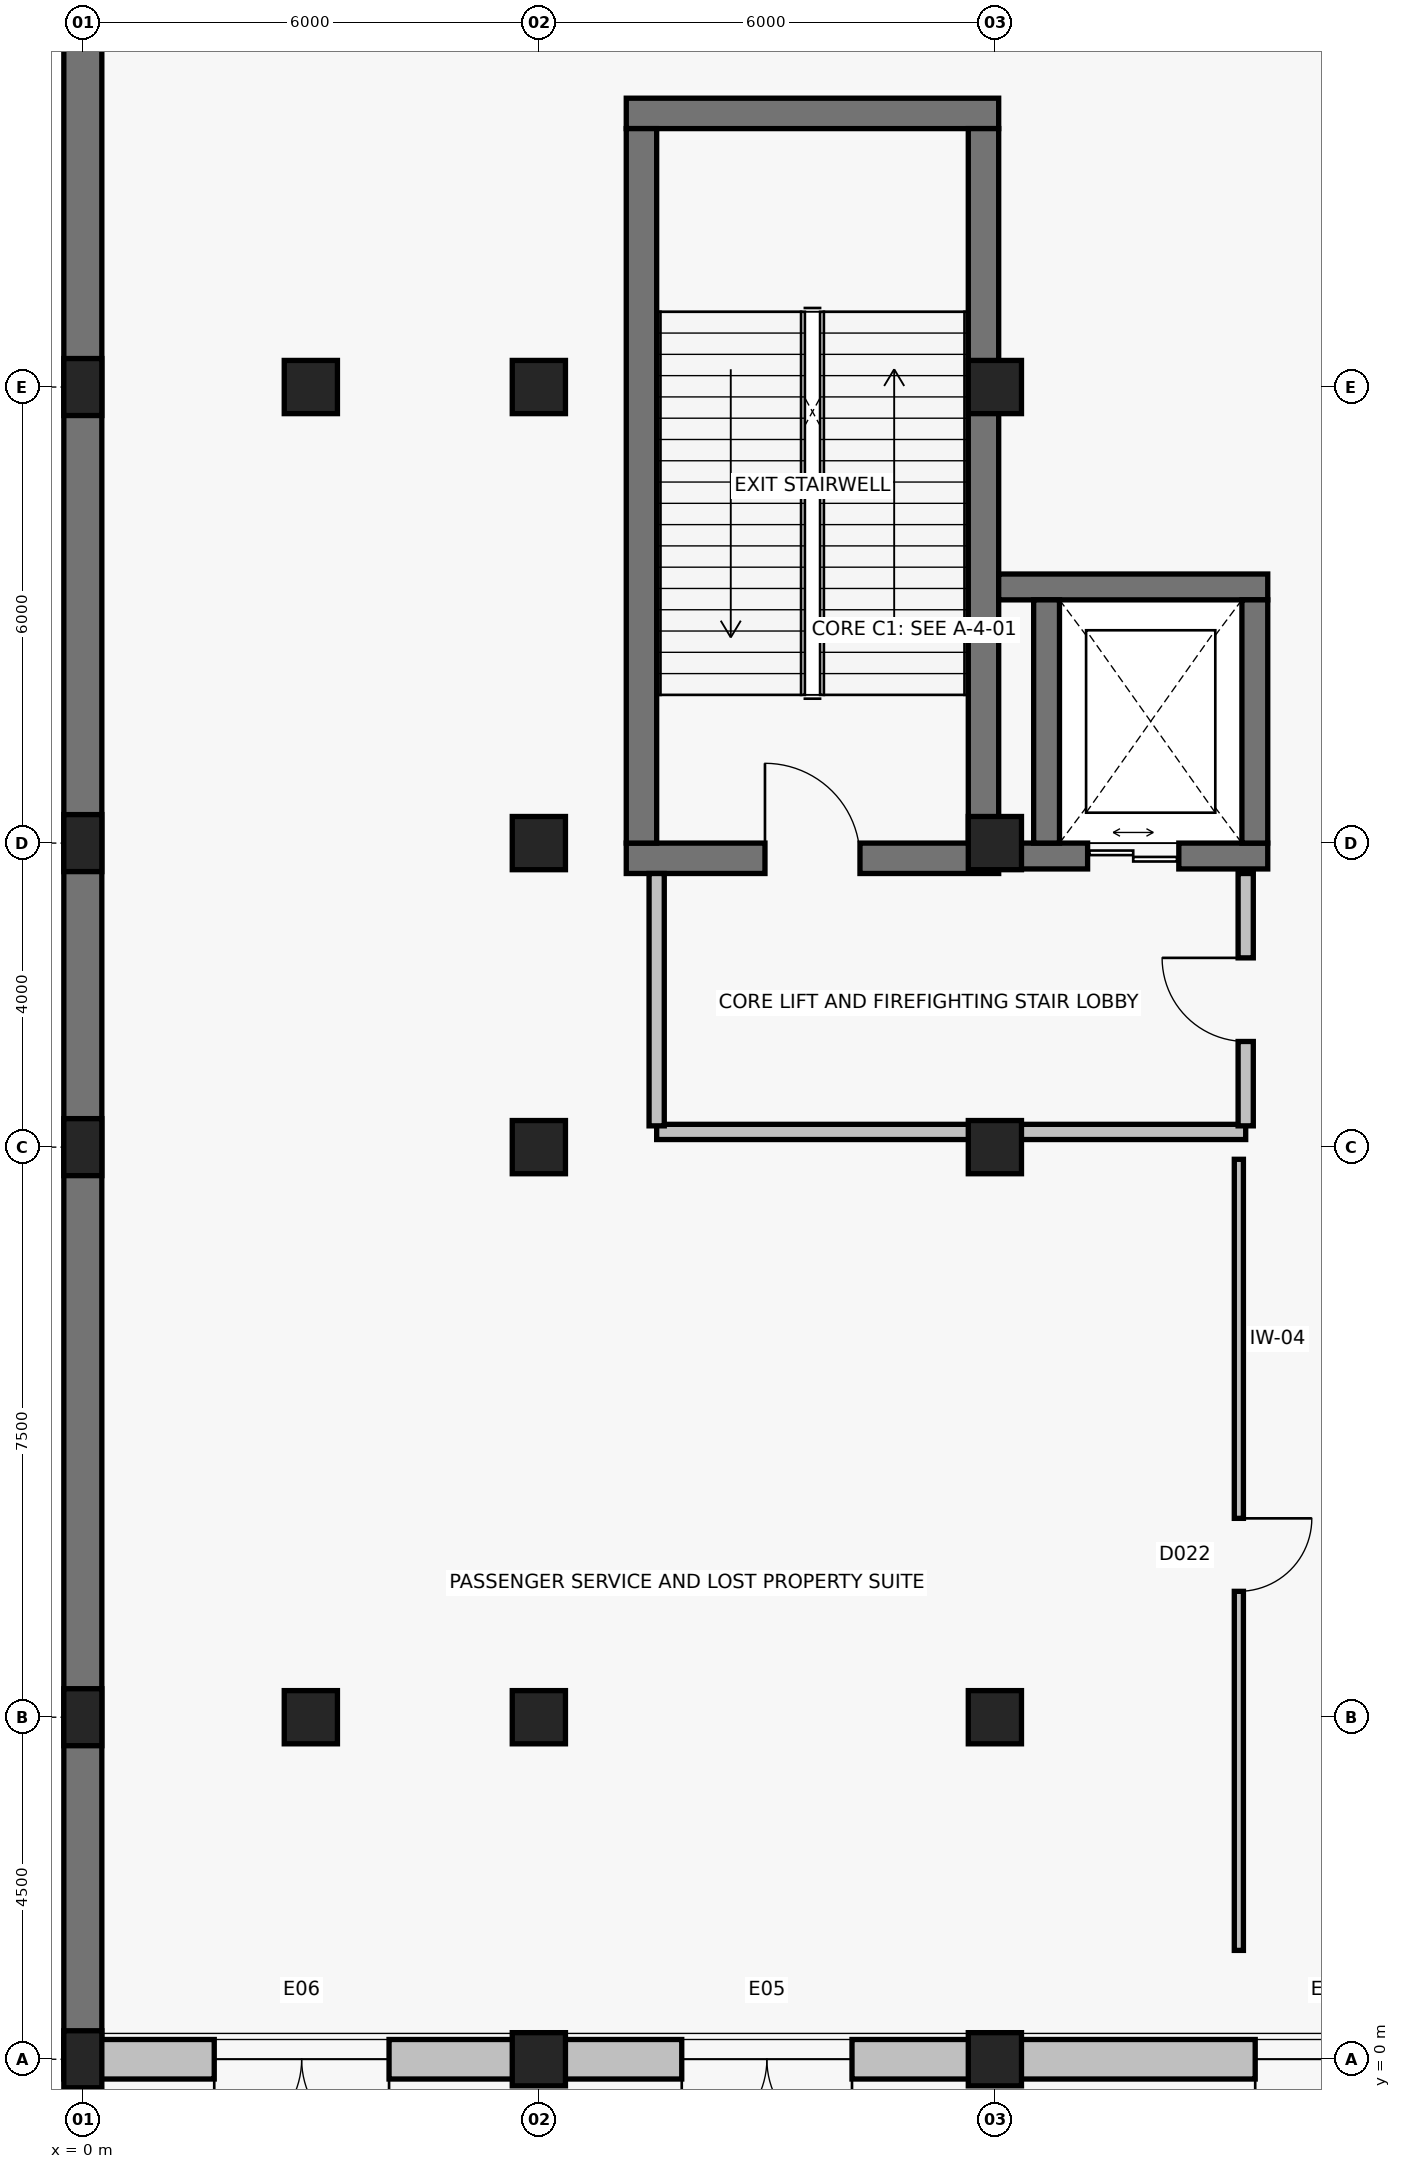
"""IFC4 building model, lengths in metres.
Left out: names, types, materials, properties, quantities, classifications, styles, units other than length and angle.
Written with IfcOpenShell. Run it as: python <this file> out.ifc"""

import sys

from ifc_helpers import new_model, si_unit, direction, frame, frame_2d, origin, origin_2d, place, context, subcontext, project, spatial, rectangle, extrude, element, fill, save


model = new_model("IFC4")
c1 = context("Model", 3, precision=1e-05, world=origin(), true_north=direction((0.0, 1.0)))
c2 = subcontext(c1, "Body", "Model", "MODEL_VIEW")
j1 = project(units=[si_unit("LENGTHUNIT", "METRE"), si_unit("PLANEANGLEUNIT", "RADIAN")], contexts=[c1])
p1 = place(None, origin())
s1 = spatial("IfcSite", under=j1, at=p1, CompositionType="ELEMENT")
p2 = place(p1, origin())
s2 = spatial("IfcBuilding", under=s1, at=p2, CompositionType="ELEMENT")
p3 = place(p2, origin())
s3 = spatial("IfcBuildingStorey", under=s2, at=p3, CompositionType="ELEMENT", Elevation=0.0)
for number, where, z_axis, x_axis in (
    (1, (0.0, 0.0, 0.0), (0.0, 0.0, 1.0), (1.0, 0.0, 0.0)),
    (2, (0.0, 4.5, 0.0), (0.0, 0.0, 1.0), (1.0, 0.0, 0.0)),
    (3, (0.0, 12.0, 0.0), (0.0, 0.0, 1.0), (1.0, 0.0, 0.0)),
    (4, (0.0, 16.0, 0.0), (0.0, 0.0, 1.0), (1.0, 0.0, 0.0)),
    (5, (0.0, 22.0, 0.0), (0.0, 0.0, 1.0), (1.0, 0.0, 0.0)),
):
    element("IfcColumn", number, at=place(p3, frame(where, z_axis=z_axis, x_axis=x_axis)), inside=s3, PredefinedType="PILASTER", context=c2, shape_type="SweptSolid", body=[
        extrude(rectangle(XDim=0.5, YDim=0.75, at=origin_2d()), origin(), (0.0, 0.0, 1.0), 6.6),
    ])
for number, where, z_axis, x_axis in (
    (6, (3.0, 4.5, 0.0), (0.0, 0.0, 1.0), (1.0, 0.0, 0.0)),
    (7, (3.0, 22.0, 0.0), (0.0, 0.0, 1.0), (1.0, 0.0, 0.0)),
    (8, (6.0, 0.0, 0.0), (0.0, 0.0, 1.0), (1.0, 0.0, 0.0)),
    (9, (6.0, 4.5, 0.0), (0.0, 0.0, 1.0), (1.0, 0.0, 0.0)),
    (10, (6.0, 12.0, 0.0), (0.0, 0.0, 1.0), (1.0, 0.0, 0.0)),
    (11, (6.0, 16.0, 0.0), (0.0, 0.0, 1.0), (1.0, 0.0, 0.0)),
    (12, (6.0, 22.0, 0.0), (0.0, 0.0, 1.0), (1.0, 0.0, 0.0)),
    (13, (12.0, 0.0, 0.0), (0.0, 0.0, 1.0), (1.0, 0.0, 0.0)),
    (14, (12.0, 4.5, 0.0), (0.0, 0.0, 1.0), (1.0, 0.0, 0.0)),
    (15, (12.0, 12.0, 0.0), (0.0, 0.0, 1.0), (1.0, 0.0, 0.0)),
    (16, (12.0, 16.0, 0.0), (0.0, 0.0, 1.0), (1.0, 0.0, 0.0)),
    (17, (12.0, 22.0, 0.0), (0.0, 0.0, 1.0), (1.0, 0.0, 0.0)),
):
    element("IfcColumn", number, at=place(p3, frame(where, z_axis=z_axis, x_axis=x_axis)), inside=s3, PredefinedType="COLUMN", context=c2, shape_type="SweptSolid", body=[
        extrude(rectangle(XDim=0.7, YDim=0.7, at=origin_2d()), origin(), (0.0, 0.0, 1.0), 6.6),
    ])
p4 = place(p3, frame((0.0, -0.008, 0.0), z_axis=(0.0, 0.0, 1.0), x_axis=(0.0, 1.0, 0.0)))
e18 = element("IfcWall", 18, at=p4, inside=s3, PredefinedType="SOLIDWALL", context=c2, shape_type="SweptSolid", body=[
    extrude(rectangle(XDim=96.016, YDim=0.5, at=frame_2d((48.008, 0.0))), origin(), (0.0, 0.0, 1.0), 6.32),
])
p5 = place(p3, frame((18.008, 0.0, 0.0), z_axis=(0.0, 0.0, 1.0), x_axis=(-1.0, 0.0, 0.0)))
e19 = element("IfcWall", 19, at=p5, inside=s3, PredefinedType="SOLIDWALL", context=c2, shape_type="SweptSolid", body=[
    extrude(rectangle(XDim=6.016, YDim=0.52, at=frame_2d((3.008, 0.0))), origin(), (0.0, 0.0, 1.0), 5.761),
])
p6 = place(p5, frame((0.633, 0.0, 0.0)))
e20 = element("IfcOpeningElement", 20, at=p6, cuts=e19, PredefinedType="OPENING", context=c2, shape_type="SweptSolid", body=[
    extrude(rectangle(XDim=1.95, YDim=2.4, at=frame_2d((0.975, 1.2))), frame((0.0, 0.275, 0.0), z_axis=(0.0, -1.0, 0.0), x_axis=(1.0, 0.0, 0.0)), (0.0, 0.0, 1.0), 0.55),
])
p7 = place(p3, frame((12.008, 0.0, 0.0), z_axis=(0.0, 0.0, 1.0), x_axis=(-1.0, 0.0, 0.0)))
e21 = element("IfcWall", 21, at=p7, inside=s3, PredefinedType="SOLIDWALL", context=c2, shape_type="SweptSolid", body=[
    extrude(rectangle(XDim=6.016, YDim=0.52, at=frame_2d((3.008, 0.0))), origin(), (0.0, 0.0, 1.0), 5.761),
])
p8 = place(p7, frame((1.888, 0.0, 0.0)))
e22 = element("IfcOpeningElement", 22, at=p8, cuts=e21, PredefinedType="OPENING", context=c2, shape_type="SweptSolid", body=[
    extrude(rectangle(XDim=2.24, YDim=2.6, at=frame_2d((1.12, 1.3))), frame((0.0, 0.275, 0.0), z_axis=(0.0, -1.0, 0.0), x_axis=(1.0, 0.0, 0.0)), (0.0, 0.0, 1.0), 0.55),
])
p9 = place(p3, frame((6.008, 0.0, 0.0), z_axis=(0.0, 0.0, 1.0), x_axis=(-1.0, 0.0, 0.0)))
e23 = element("IfcWall", 23, at=p9, inside=s3, PredefinedType="SOLIDWALL", context=c2, shape_type="SweptSolid", body=[
    extrude(rectangle(XDim=6.258, YDim=0.52, at=frame_2d((3.129, 0.0))), origin(), (0.0, 0.0, 1.0), 5.837),
])
p10 = place(p9, frame((1.979, 0.0, 0.0)))
e24 = element("IfcOpeningElement", 24, at=p10, cuts=e23, PredefinedType="OPENING", context=c2, shape_type="SweptSolid", body=[
    extrude(rectangle(XDim=2.3, YDim=2.65, at=frame_2d((1.15, 1.325))), frame((0.0, 0.275, 0.0), z_axis=(0.0, -1.0, 0.0), x_axis=(1.0, 0.0, 0.0)), (0.0, 0.0, 1.0), 0.55),
])
p11 = place(p3, frame((7.15, 15.8, 0.0), z_axis=(0.0, 0.0, 1.0), x_axis=(1.0, 0.0, 0.0)))
e25 = element("IfcWall", 25, at=p11, inside=s3, PredefinedType="SHEAR", context=c2, shape_type="SweptSolid", body=[
    extrude(rectangle(XDim=4.9, YDim=0.4, at=frame_2d((2.45, 0.0))), origin(), (0.0, 0.0, 1.0), 6.32),
])
p12 = place(p11, frame((1.825, 0.0, 0.0)))
e26 = element("IfcOpeningElement", 26, at=p12, cuts=e25, PredefinedType="OPENING", context=c2, shape_type="SweptSolid", body=[
    extrude(rectangle(XDim=1.25, YDim=2.2, at=frame_2d((0.625, 1.1))), frame((0.0, 0.215, 0.0), z_axis=(0.0, -1.0, 0.0), x_axis=(1.0, 0.0, 0.0)), (0.0, 0.0, 1.0), 0.43),
])
p13 = place(p3, frame((12.05, 25.6, 0.0), z_axis=(0.0, 0.0, 1.0), x_axis=(-1.0, 0.0, 0.0)))
e27 = element("IfcWall", 27, at=p13, inside=s3, PredefinedType="SHEAR", context=c2, shape_type="SweptSolid", body=[
    extrude(rectangle(XDim=4.9, YDim=0.4, at=frame_2d((2.45, 0.0))), origin(), (0.0, 0.0, 1.0), 6.32),
])
for number, where, z_axis, x_axis in (
    (28, (7.35, 25.4, 0.0), (0.0, 0.0, 1.0), (0.0, -1.0, 0.0)),
    (29, (11.85, 16.0, 0.0), (0.0, 0.0, 1.0), (0.0, 1.0, 0.0)),
):
    element("IfcWall", number, at=place(p3, frame(where, z_axis=z_axis, x_axis=x_axis)), inside=s3, PredefinedType="SHEAR", context=c2, shape_type="SweptSolid", body=[
        extrude(rectangle(XDim=9.4, YDim=0.4, at=frame_2d((4.7, 0.0))), origin(), (0.0, 0.0, 1.0), 6.32),
    ])
p14 = place(p3, frame((12.05, 15.83, 0.0), z_axis=(0.0, 0.0, 1.0), x_axis=(1.0, 0.0, 0.0)))
e30 = element("IfcWall", 30, at=p14, inside=s3, PredefinedType="SHEAR", context=c2, shape_type="SweptSolid", body=[
    extrude(rectangle(XDim=3.54, YDim=0.34, at=frame_2d((1.77, 0.0))), origin(), (0.0, 0.0, 1.0), 6.32),
])
p15 = place(p14, frame((1.17, 0.0, 0.0)))
e31 = element("IfcOpeningElement", 31, at=p15, cuts=e30, PredefinedType="OPENING", context=c2, shape_type="SweptSolid", body=[
    extrude(rectangle(XDim=1.2, YDim=2.2, at=frame_2d((0.6, 1.1))), frame((0.0, 0.185, 0.0), z_axis=(0.0, -1.0, 0.0), x_axis=(1.0, 0.0, 0.0)), (0.0, 0.0, 1.0), 0.37),
])
p16 = place(p3, frame((15.59, 19.37, 0.0), z_axis=(0.0, 0.0, 1.0), x_axis=(-1.0, 0.0, 0.0)))
e32 = element("IfcWall", 32, at=p16, inside=s3, PredefinedType="SHEAR", context=c2, shape_type="SweptSolid", body=[
    extrude(rectangle(XDim=3.54, YDim=0.34, at=frame_2d((1.77, 0.0))), origin(), (0.0, 0.0, 1.0), 6.32),
])
for number, where, z_axis, x_axis in (
    (33, (12.68, 19.2, 0.0), (0.0, 0.0, 1.0), (0.0, -1.0, 0.0)),
    (34, (15.42, 16.0, 0.0), (0.0, 0.0, 1.0), (0.0, 1.0, 0.0)),
):
    element("IfcWall", number, at=place(p3, frame(where, z_axis=z_axis, x_axis=x_axis)), inside=s3, PredefinedType="SHEAR", context=c2, shape_type="SweptSolid", body=[
        extrude(rectangle(XDim=3.2, YDim=0.34, at=frame_2d((1.6, 0.0))), origin(), (0.0, 0.0, 1.0), 6.32),
    ])
p17 = place(p3, frame((7.55, 12.2, 0.0), z_axis=(0.0, 0.0, 1.0), x_axis=(1.0, 0.0, 0.0)))
e35 = element("IfcWall", 35, at=p17, inside=s3, PredefinedType="PARTITIONING", context=c2, shape_type="SweptSolid", body=[
    extrude(rectangle(XDim=7.75, YDim=0.2, at=frame_2d((3.875, 0.0))), origin(), (0.0, 0.0, 1.0), 5.837),
])
p18 = place(p3, frame((7.55, 15.6, 0.0), z_axis=(0.0, 0.0, 1.0), x_axis=(0.0, -1.0, 0.0)))
e36 = element("IfcWall", 36, at=p18, inside=s3, PredefinedType="PARTITIONING", context=c2, shape_type="SweptSolid", body=[
    extrude(rectangle(XDim=3.32, YDim=0.2, at=frame_2d((1.66, 0.0))), origin(), (0.0, 0.0, 1.0), 5.837),
])
p19 = place(p3, frame((15.3, 12.28, 0.0), z_axis=(0.0, 0.0, 1.0), x_axis=(0.0, 1.0, 0.0)))
e37 = element("IfcWall", 37, at=p19, inside=s3, PredefinedType="PARTITIONING", context=c2, shape_type="SweptSolid", body=[
    extrude(rectangle(XDim=3.32, YDim=0.2, at=frame_2d((1.66, 0.0))), origin(), (0.0, 0.0, 1.0), 5.89),
])
p20 = place(p19, frame((1.11, 0.0, 0.0)))
e38 = element("IfcOpeningElement", 38, at=p20, cuts=e37, PredefinedType="OPENING", context=c2, shape_type="SweptSolid", body=[
    extrude(rectangle(XDim=1.1, YDim=2.15, at=frame_2d((0.55, 1.075))), frame((0.0, 0.115, 0.0), z_axis=(0.0, -1.0, 0.0), x_axis=(1.0, 0.0, 0.0)), (0.0, 0.0, 1.0), 0.23),
])
p21 = place(p3, frame((15.21, 11.84, 0.0), z_axis=(0.0, 0.0, 1.0), x_axis=(0.0, -1.0, 0.0)))
e39 = element("IfcWall", 39, at=p21, inside=s3, PredefinedType="PARTITIONING", context=c2, shape_type="SweptSolid", body=[
    extrude(rectangle(XDim=10.408, YDim=0.12, at=frame_2d((5.204, 0.0))), origin(), (0.0, 0.0, 1.0), 5.89),
])
p22 = place(p21, frame((4.724, 0.0, 0.0)))
e40 = element("IfcOpeningElement", 40, at=p22, cuts=e39, PredefinedType="OPENING", context=c2, shape_type="SweptSolid", body=[
    extrude(rectangle(XDim=0.96, YDim=2.1, at=frame_2d((0.48, 1.05))), frame((0.0, 0.075, 0.0), z_axis=(0.0, -1.0, 0.0), x_axis=(1.0, 0.0, 0.0)), (0.0, 0.0, 1.0), 0.15),
])
p23 = place(p6, origin())
e41 = element("IfcDoor", 41, at=p23, inside=s3, OperationType="DOUBLE_DOOR_SINGLE_SWING", PredefinedType="DOOR", context=c2, shape_type="SweptSolid", body=[
    extrude(rectangle(XDim=1.95, YDim=2.4, at=frame_2d((0.975, 1.2))), frame((0.0, 0.025, 0.0), z_axis=(0.0, -1.0, 0.0), x_axis=(1.0, 0.0, 0.0)), (0.0, 0.0, 1.0), 0.05),
])
fill(e20, e41)
p24 = place(p8, origin())
e42 = element("IfcDoor", 42, at=p24, inside=s3, OperationType="DOUBLE_DOOR_SINGLE_SWING", PredefinedType="DOOR", context=c2, shape_type="SweptSolid", body=[
    extrude(rectangle(XDim=2.24, YDim=2.6, at=frame_2d((1.12, 1.3))), frame((0.0, 0.025, 0.0), z_axis=(0.0, -1.0, 0.0), x_axis=(1.0, 0.0, 0.0)), (0.0, 0.0, 1.0), 0.05),
])
fill(e22, e42)
p25 = place(p10, origin())
e43 = element("IfcDoor", 43, at=p25, inside=s3, OperationType="DOUBLE_DOOR_SINGLE_SWING", PredefinedType="DOOR", context=c2, shape_type="SweptSolid", body=[
    extrude(rectangle(XDim=2.3, YDim=2.65, at=frame_2d((1.15, 1.325))), frame((0.0, 0.025, 0.0), z_axis=(0.0, -1.0, 0.0), x_axis=(1.0, 0.0, 0.0)), (0.0, 0.0, 1.0), 0.05),
])
fill(e24, e43)
p26 = place(p12, origin())
e44 = element("IfcDoor", 44, at=p26, inside=s3, OperationType="SINGLE_SWING_LEFT", PredefinedType="DOOR", context=c2, shape_type="SweptSolid", body=[
    extrude(rectangle(XDim=1.25, YDim=2.2, at=frame_2d((0.625, 1.1))), frame((0.0, 0.025, 0.0), z_axis=(0.0, -1.0, 0.0), x_axis=(1.0, 0.0, 0.0)), (0.0, 0.0, 1.0), 0.05),
])
fill(e26, e44)
p27 = place(p15, origin())
e45 = element("IfcDoor", 45, at=p27, inside=s3, OperationType="DOUBLE_DOOR_SLIDING", PredefinedType="DOOR", context=c2, shape_type="SweptSolid", body=[
    extrude(rectangle(XDim=1.2, YDim=2.2, at=frame_2d((0.6, 1.1))), frame((0.0, 0.025, 0.0), z_axis=(0.0, -1.0, 0.0), x_axis=(1.0, 0.0, 0.0)), (0.0, 0.0, 1.0), 0.05),
])
fill(e31, e45)
p28 = place(p20, origin())
e46 = element("IfcDoor", 46, at=p28, inside=s3, OperationType="SINGLE_SWING_RIGHT", PredefinedType="DOOR", context=c2, shape_type="SweptSolid", body=[
    extrude(rectangle(XDim=1.1, YDim=2.15, at=frame_2d((0.55, 1.075))), frame((0.0, 0.025, 0.0), z_axis=(0.0, -1.0, 0.0), x_axis=(1.0, 0.0, 0.0)), (0.0, 0.0, 1.0), 0.05),
])
fill(e38, e46)
p29 = place(p22, origin())
e47 = element("IfcDoor", 47, at=p29, inside=s3, OperationType="SINGLE_SWING_LEFT", PredefinedType="DOOR", context=c2, shape_type="SweptSolid", body=[
    extrude(rectangle(XDim=0.96, YDim=2.1, at=frame_2d((0.48, 1.05))), frame((0.0, 0.025, 0.0), z_axis=(0.0, -1.0, 0.0), x_axis=(1.0, 0.0, 0.0)), (0.0, 0.0, 1.0), 0.05),
])
fill(e40, e47)
save(model, sys.argv[1])
